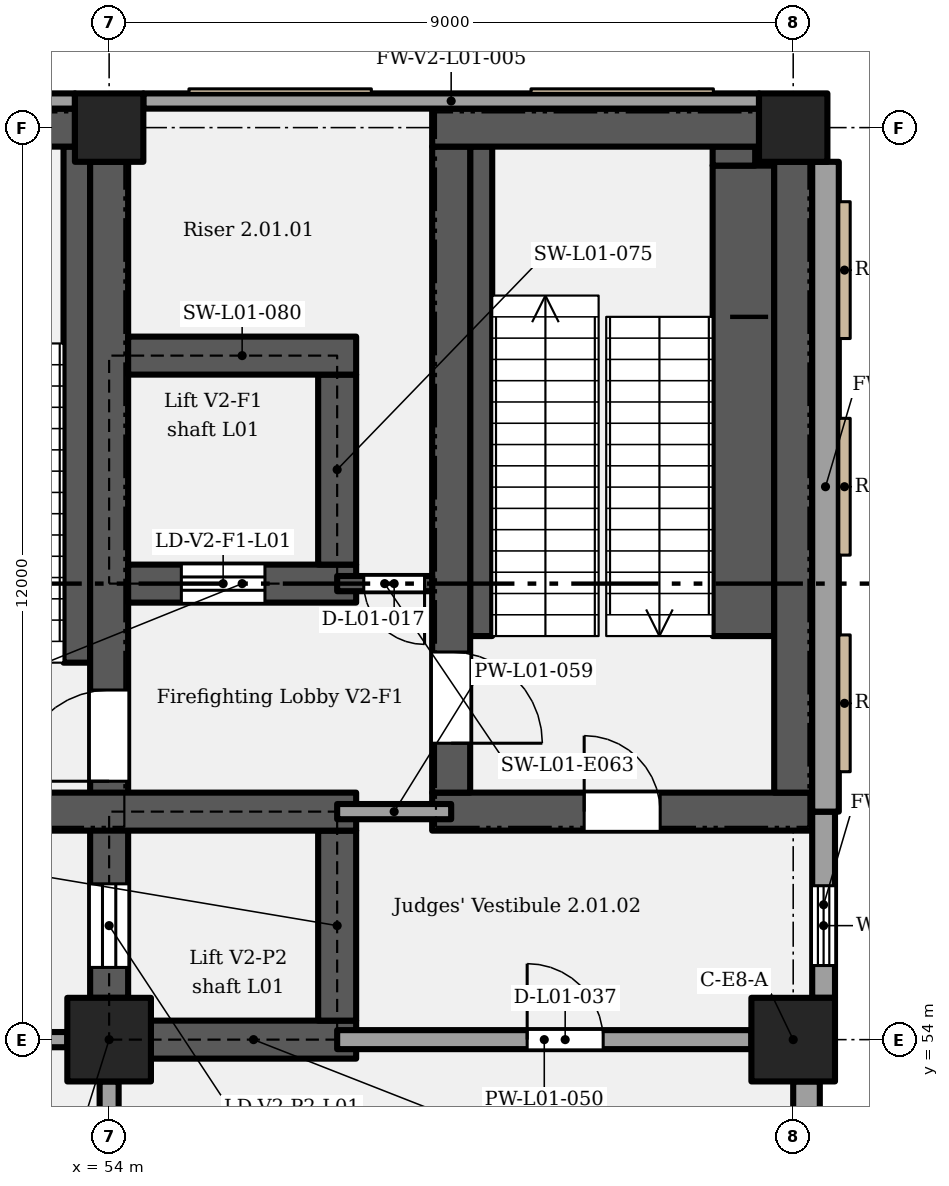
"""IFC4 building model, lengths in metres.
Left out: names, types, materials, properties, quantities, classifications, styles, units other than length and angle.
Written with IfcOpenShell. Run it as: python <this file> out.ifc"""

import sys

from ifc_helpers import new_model, si_unit, direction, frame, frame_2d, origin, origin_2d, place, context, subcontext, project, spatial, rectangle, extrude, element, fill, save


model = new_model("IFC4")
c1 = context("Model", 3, precision=1e-05, world=origin(), true_north=direction((0.0, 1.0)))
c2 = subcontext(c1, "Body", "Model", "MODEL_VIEW")
j1 = project(units=[si_unit("LENGTHUNIT", "METRE"), si_unit("PLANEANGLEUNIT", "RADIAN")], contexts=[c1])
p1 = place(None, origin())
s1 = spatial("IfcSite", under=j1, at=p1, CompositionType="ELEMENT")
p2 = place(p1, origin())
s2 = spatial("IfcBuilding", under=s1, at=p2, CompositionType="ELEMENT")
p3 = place(p2, frame((0.0, 0.0, 6.6)))
s3 = spatial("IfcBuildingStorey", under=s2, at=p3, CompositionType="ELEMENT", Elevation=6.6)
for number, where, z_axis, x_axis in (
    (1, (54.0, 54.0, 0.0), (0.0, 0.0, 1.0), (1.0, 0.0, 0.0)),
    (2, (63.0, 54.0, 0.0), (0.0, 0.0, 1.0), (1.0, 0.0, 0.0)),
):
    element("IfcColumn", number, at=place(p3, frame(where, z_axis=z_axis, x_axis=x_axis)), inside=s3, PredefinedType="COLUMN", context=c2, shape_type="SweptSolid", body=[
        extrude(rectangle(XDim=1.1, YDim=1.1, at=origin_2d()), origin(), (0.0, 0.0, 1.0), 5.4),
    ])
for number, where, z_axis, x_axis in (
    (3, (54.0, 66.0, 0.0), (0.0, 0.0, 1.0), (1.0, 0.0, 0.0)),
    (4, (63.0, 66.0, 0.0), (0.0, 0.0, 1.0), (1.0, 0.0, 0.0)),
):
    element("IfcColumn", number, at=place(p3, frame(where, z_axis=z_axis, x_axis=x_axis)), inside=s3, PredefinedType="COLUMN", context=c2, shape_type="SweptSolid", body=[
        extrude(rectangle(XDim=0.9, YDim=0.9, at=origin_2d()), origin(), (0.0, 0.0, 1.0), 5.4),
    ])
p4 = place(p3, frame((54.55, 54.0, 0.0), z_axis=(0.0, 0.0, 1.0), x_axis=(1.0, 0.0, 0.0)))
e5 = element("IfcWall", 5, at=p4, inside=s3, PredefinedType="SHEAR", context=c2, shape_type="SweptSolid", body=[
    extrude(rectangle(XDim=2.7, YDim=0.5, at=frame_2d((1.35, 0.0))), origin(), (0.0, 0.0, 1.0), 5.1),
])
p5 = place(p3, frame((57.0, 54.25, 0.0), z_axis=(0.0, 0.0, 1.0), x_axis=(0.0, 1.0, 0.0)))
e6 = element("IfcWall", 6, at=p5, inside=s3, PredefinedType="SHEAR", context=c2, shape_type="SweptSolid", body=[
    extrude(rectangle(XDim=2.5, YDim=0.5, at=frame_2d((1.25, 0.0))), origin(), (0.0, 0.0, 1.0), 5.1),
])
p6 = place(p3, frame((54.0, 54.55, 0.0), z_axis=(0.0, 0.0, 1.0), x_axis=(0.0, 1.0, 0.0)))
e7 = element("IfcWall", 7, at=p6, inside=s3, PredefinedType="SHEAR", context=c2, shape_type="SweptSolid", body=[
    extrude(rectangle(XDim=11.0, YDim=0.5, at=frame_2d((5.5, 0.0))), origin(), (0.0, 0.0, 1.0), 5.1),
])
p7 = place(p6, frame((0.4, 0.0, 0.0)))
e8 = element("IfcOpeningElement", 8, at=p7, cuts=e7, PredefinedType="OPENING", context=c2, shape_type="SweptSolid", body=[
    extrude(rectangle(XDim=1.1, YDim=2.1, at=frame_2d((0.55, 1.05))), frame((0.0, 0.26, 0.0), z_axis=(0.0, -1.0, 0.0), x_axis=(1.0, 0.0, 0.0)), (0.0, 0.0, 1.0), 0.52),
])
p8 = place(p6, frame((2.85, 0.0, 0.0)))
e9 = element("IfcOpeningElement", 9, at=p8, cuts=e7, PredefinedType="OPENING", context=c2, shape_type="SweptSolid", body=[
    extrude(rectangle(XDim=1.2, YDim=2.1, at=frame_2d((0.6, 1.05))), frame((0.0, 0.26, 0.0), z_axis=(0.0, -1.0, 0.0), x_axis=(1.0, 0.0, 0.0)), (0.0, 0.0, 1.0), 0.52),
])
p9 = place(p3, frame((46.25, 57.0, 0.0), z_axis=(0.0, 0.0, 1.0), x_axis=(1.0, 0.0, 0.0)))
e10 = element("IfcWall", 10, at=p9, inside=s3, PredefinedType="SHEAR", context=c2, shape_type="SweptSolid", body=[
    extrude(rectangle(XDim=11.0, YDim=0.5, at=frame_2d((5.5, 0.0))), origin(), (0.0, 0.0, 1.0), 5.1),
])
p10 = place(p9, frame((4.9, 0.0, 0.0)))
e11 = element("IfcOpeningElement", 11, at=p10, cuts=e10, PredefinedType="OPENING", context=c2, shape_type="SweptSolid", body=[
    extrude(rectangle(XDim=1.2, YDim=2.1, at=frame_2d((0.6, 1.05))), frame((0.0, 0.26, 0.0), z_axis=(0.0, -1.0, 0.0), x_axis=(1.0, 0.0, 0.0)), (0.0, 0.0, 1.0), 0.52),
])
p11 = place(p3, frame((58.25, 57.0, 0.0), z_axis=(0.0, 0.0, 1.0), x_axis=(1.0, 0.0, 0.0)))
e12 = element("IfcWall", 12, at=p11, inside=s3, PredefinedType="SHEAR", context=c2, shape_type="SweptSolid", body=[
    extrude(rectangle(XDim=5.0, YDim=0.5, at=frame_2d((2.5, 0.0))), origin(), (0.0, 0.0, 1.0), 5.1),
])
p12 = place(p11, frame((2.0, 0.0, 0.0)))
e13 = element("IfcOpeningElement", 13, at=p12, cuts=e12, PredefinedType="OPENING", context=c2, shape_type="SweptSolid", body=[
    extrude(rectangle(XDim=1.0, YDim=2.1, at=frame_2d((0.5, 1.05))), frame((0.0, 0.26, 0.0), z_axis=(0.0, -1.0, 0.0), x_axis=(1.0, 0.0, 0.0)), (0.0, 0.0, 1.0), 0.52),
])
p13 = place(p3, frame((58.5, 57.25, 0.0), z_axis=(0.0, 0.0, 1.0), x_axis=(0.0, 1.0, 0.0)))
e14 = element("IfcWall", 14, at=p13, inside=s3, PredefinedType="SHEAR", context=c2, shape_type="SweptSolid", body=[
    extrude(rectangle(XDim=8.5, YDim=0.5, at=frame_2d((4.25, 0.0))), origin(), (0.0, 0.0, 1.0), 5.1),
])
p14 = place(p13, frame((1.85, 0.0, 0.0), z_axis=(0.0, 0.0, 1.0), x_axis=(-1.0, 0.0, 0.0)))
e15 = element("IfcOpeningElement", 15, at=p14, cuts=e14, PredefinedType="OPENING", context=c2, shape_type="SweptSolid", body=[
    extrude(rectangle(XDim=1.2, YDim=2.1, at=frame_2d((0.6, 1.05))), frame((0.0, 0.26, 0.0), z_axis=(0.0, -1.0, 0.0), x_axis=(1.0, 0.0, 0.0)), (0.0, 0.0, 1.0), 0.52),
])
p15 = place(p3, frame((63.0, 57.25, 0.0), z_axis=(0.0, 0.0, 1.0), x_axis=(0.0, 1.0, 0.0)))
e16 = element("IfcWall", 16, at=p15, inside=s3, PredefinedType="SHEAR", context=c2, shape_type="SweptSolid", body=[
    extrude(rectangle(XDim=8.3, YDim=0.5, at=frame_2d((4.15, 0.0))), origin(), (0.0, 0.0, 1.0), 5.1),
])
p16 = place(p3, frame((54.25, 60.0, 0.0), z_axis=(0.0, 0.0, 1.0), x_axis=(1.0, 0.0, 0.0)))
e17 = element("IfcWall", 17, at=p16, inside=s3, PredefinedType="SHEAR", context=c2, shape_type="SweptSolid", body=[
    extrude(rectangle(XDim=3.0, YDim=0.5, at=frame_2d((1.5, 0.0))), origin(), (0.0, 0.0, 1.0), 5.1),
])
p17 = place(p16, frame((0.7, 0.0, 0.0)))
e18 = element("IfcOpeningElement", 18, at=p17, cuts=e17, PredefinedType="OPENING", context=c2, shape_type="SweptSolid", body=[
    extrude(rectangle(XDim=1.1, YDim=2.1, at=frame_2d((0.55, 1.05))), frame((0.0, 0.26, 0.0), z_axis=(0.0, -1.0, 0.0), x_axis=(1.0, 0.0, 0.0)), (0.0, 0.0, 1.0), 0.52),
])
p18 = place(p3, frame((57.0, 60.25, 0.0), z_axis=(0.0, 0.0, 1.0), x_axis=(0.0, 1.0, 0.0)))
e19 = element("IfcWall", 19, at=p18, inside=s3, PredefinedType="SHEAR", context=c2, shape_type="SweptSolid", body=[
    extrude(rectangle(XDim=2.5, YDim=0.5, at=frame_2d((1.25, 0.0))), origin(), (0.0, 0.0, 1.0), 5.1),
])
p19 = place(p3, frame((54.25, 63.0, 0.0), z_axis=(0.0, 0.0, 1.0), x_axis=(1.0, 0.0, 0.0)))
e20 = element("IfcWall", 20, at=p19, inside=s3, PredefinedType="SHEAR", context=c2, shape_type="SweptSolid", body=[
    extrude(rectangle(XDim=3.0, YDim=0.5, at=frame_2d((1.5, 0.0))), origin(), (0.0, 0.0, 1.0), 5.1),
])
for number, where, z_axis, x_axis in (
    (21, (49.25, 66.0, 0.0), (0.0, 0.0, 1.0), (1.0, 0.0, 0.0)),
    (22, (58.25, 66.0, 0.0), (0.0, 0.0, 1.0), (1.0, 0.0, 0.0)),
):
    element("IfcWall", number, at=place(p3, frame(where, z_axis=z_axis, x_axis=x_axis)), inside=s3, PredefinedType="SHEAR", context=c2, shape_type="SweptSolid", body=[
        extrude(rectangle(XDim=4.3, YDim=0.5, at=frame_2d((2.15, 0.0))), origin(), (0.0, 0.0, 1.0), 5.1),
    ])
p20 = place(p3, frame((45.45, 66.35, 0.0), z_axis=(0.0, 0.0, 1.0), x_axis=(1.0, 0.0, 0.0)))
e23 = element("IfcWall", 23, at=p20, inside=s3, PredefinedType="SOLIDWALL", context=c2, shape_type="SweptSolid", body=[
    extrude(rectangle(XDim=8.1, YDim=0.2, at=frame_2d((4.05, 0.0))), origin(), (0.0, 0.0, 1.0), 5.1),
])
p21 = place(p20, frame((0.6, 0.0, 0.9)))
e24 = element("IfcOpeningElement", 24, at=p21, cuts=e23, PredefinedType="OPENING", context=c2, shape_type="SweptSolid", body=[
    extrude(rectangle(XDim=2.4, YDim=3.3, at=frame_2d((1.2, 1.65))), frame((0.0, 0.11, 0.0), z_axis=(0.0, -1.0, 0.0), x_axis=(1.0, 0.0, 0.0)), (0.0, 0.0, 1.0), 0.22),
])
p22 = place(p3, frame((54.45, 66.35, 0.0), z_axis=(0.0, 0.0, 1.0), x_axis=(1.0, 0.0, 0.0)))
e25 = element("IfcWall", 25, at=p22, inside=s3, PredefinedType="SOLIDWALL", context=c2, shape_type="SweptSolid", body=[
    extrude(rectangle(XDim=8.1, YDim=0.2, at=frame_2d((4.05, 0.0))), origin(), (0.0, 0.0, 1.0), 5.1),
])
p23 = place(p3, frame((63.175, 38.05, 0.0), z_axis=(0.0, 0.0, 1.0), x_axis=(0.0, 1.0, 0.0)))
e26 = element("IfcWall", 26, at=p23, inside=s3, PredefinedType="SOLIDWALL", context=c2, shape_type="SweptSolid", body=[
    extrude(rectangle(XDim=15.4, YDim=0.35, at=frame_2d((7.7, 0.0))), origin(), (0.0, 0.0, 1.0), 5.4),
])
p24 = place(p23, frame((0.35, 0.0, 1.05)))
e27 = element("IfcOpeningElement", 27, at=p24, cuts=e26, PredefinedType="OPENING", context=c2, shape_type="SweptSolid", body=[
    extrude(rectangle(XDim=1.5, YDim=3.75, at=frame_2d((0.75, 1.875))), frame((0.0, 0.185, 0.0), z_axis=(0.0, -1.0, 0.0), x_axis=(1.0, 0.0, 0.0)), (0.0, 0.0, 1.0), 0.37),
])
p25 = place(p23, frame((3.65, 0.0, 1.05)))
e28 = element("IfcOpeningElement", 28, at=p25, cuts=e26, PredefinedType="OPENING", context=c2, shape_type="SweptSolid", body=[
    extrude(rectangle(XDim=1.5, YDim=3.75, at=frame_2d((0.75, 1.875))), frame((0.0, 0.185, 0.0), z_axis=(0.0, -1.0, 0.0), x_axis=(1.0, 0.0, 0.0)), (0.0, 0.0, 1.0), 0.37),
])
p26 = place(p23, frame((6.95, 0.0, 1.05)))
e29 = element("IfcOpeningElement", 29, at=p26, cuts=e26, PredefinedType="OPENING", context=c2, shape_type="SweptSolid", body=[
    extrude(rectangle(XDim=1.5, YDim=3.75, at=frame_2d((0.75, 1.875))), frame((0.0, 0.185, 0.0), z_axis=(0.0, -1.0, 0.0), x_axis=(1.0, 0.0, 0.0)), (0.0, 0.0, 1.0), 0.37),
])
p27 = place(p23, frame((10.25, 0.0, 1.05)))
e30 = element("IfcOpeningElement", 30, at=p27, cuts=e26, PredefinedType="OPENING", context=c2, shape_type="SweptSolid", body=[
    extrude(rectangle(XDim=1.5, YDim=3.75, at=frame_2d((0.75, 1.875))), frame((0.0, 0.185, 0.0), z_axis=(0.0, -1.0, 0.0), x_axis=(1.0, 0.0, 0.0)), (0.0, 0.0, 1.0), 0.37),
])
p28 = place(p23, frame((13.55, 0.0, 1.05)))
e31 = element("IfcOpeningElement", 31, at=p28, cuts=e26, PredefinedType="OPENING", context=c2, shape_type="SweptSolid", body=[
    extrude(rectangle(XDim=1.5, YDim=3.75, at=frame_2d((0.75, 1.875))), frame((0.0, 0.185, 0.0), z_axis=(0.0, -1.0, 0.0), x_axis=(1.0, 0.0, 0.0)), (0.0, 0.0, 1.0), 0.37),
])
p29 = place(p3, frame((63.4, 54.55, 0.0), z_axis=(0.0, 0.0, 1.0), x_axis=(0.0, 1.0, 0.0)))
e32 = element("IfcWall", 32, at=p29, inside=s3, PredefinedType="SOLIDWALL", context=c2, shape_type="SweptSolid", body=[
    extrude(rectangle(XDim=2.45, YDim=0.3, at=frame_2d((1.225, 0.0))), origin(), (0.0, 0.0, 1.0), 5.1),
])
p30 = place(p29, frame((0.425, 0.0, 1.05)))
e33 = element("IfcOpeningElement", 33, at=p30, cuts=e32, PredefinedType="OPENING", context=c2, shape_type="SweptSolid", body=[
    extrude(rectangle(XDim=1.05, YDim=2.4, at=frame_2d((0.525, 1.2))), frame((0.0, 0.16, 0.0), z_axis=(0.0, -1.0, 0.0), x_axis=(1.0, 0.0, 0.0)), (0.0, 0.0, 1.0), 0.32),
])
p31 = place(p3, frame((63.425, 57.0, 0.0), z_axis=(0.0, 0.0, 1.0), x_axis=(0.0, 1.0, 0.0)))
e34 = element("IfcWall", 34, at=p31, inside=s3, PredefinedType="SOLIDWALL", context=c2, shape_type="SweptSolid", body=[
    extrude(rectangle(XDim=8.55, YDim=0.35, at=frame_2d((4.275, 0.0))), origin(), (0.0, 0.0, 1.0), 5.1),
])
p32 = place(p3, frame((49.5, 54.0, 0.0), z_axis=(0.0, 0.0, 1.0), x_axis=(1.0, 0.0, 0.0)))
e35 = element("IfcWall", 35, at=p32, inside=s3, PredefinedType="PARTITIONING", context=c2, shape_type="SweptSolid", body=[
    extrude(rectangle(XDim=3.95, YDim=0.2, at=frame_2d((1.975, 0.0))), origin(), (0.0, 0.0, 1.0), 4.35),
])
p33 = place(p32, frame((1.35, 0.0, 0.0)))
e36 = element("IfcOpeningElement", 36, at=p33, cuts=e35, PredefinedType="OPENING", context=c2, shape_type="SweptSolid", body=[
    extrude(rectangle(XDim=1.8, YDim=2.1, at=frame_2d((0.9, 1.05))), frame((0.0, 0.11, 0.0), z_axis=(0.0, -1.0, 0.0), x_axis=(1.0, 0.0, 0.0)), (0.0, 0.0, 1.0), 0.22),
])
p34 = place(p3, frame((57.0, 54.0, 0.0), z_axis=(0.0, 0.0, 1.0), x_axis=(1.0, 0.0, 0.0)))
e37 = element("IfcWall", 37, at=p34, inside=s3, PredefinedType="PARTITIONING", context=c2, shape_type="SweptSolid", body=[
    extrude(rectangle(XDim=5.45, YDim=0.25, at=frame_2d((2.725, 0.0))), origin(), (0.0, 0.0, 1.0), 4.35),
])
p35 = place(p34, frame((2.5, 0.0, 0.0)))
e38 = element("IfcOpeningElement", 38, at=p35, cuts=e37, PredefinedType="OPENING", context=c2, shape_type="SweptSolid", body=[
    extrude(rectangle(XDim=1.0, YDim=2.1, at=frame_2d((0.5, 1.05))), frame((0.0, 0.135, 0.0), z_axis=(0.0, -1.0, 0.0), x_axis=(1.0, 0.0, 0.0)), (0.0, 0.0, 1.0), 0.27),
])
p36 = place(p3, frame((57.0, 57.0, 0.0), z_axis=(0.0, 0.0, 1.0), x_axis=(1.0, 0.0, 0.0)))
e39 = element("IfcWall", 39, at=p36, inside=s3, PredefinedType="PARTITIONING", context=c2, shape_type="SweptSolid", body=[
    extrude(rectangle(XDim=1.5, YDim=0.2, at=frame_2d((0.75, 0.0))), origin(), (0.0, 0.0, 1.0), 5.1),
])
p37 = place(p3, frame((57.0, 60.0, 0.0), z_axis=(0.0, 0.0, 1.0), x_axis=(1.0, 0.0, 0.0)))
e40 = element("IfcWall", 40, at=p37, inside=s3, PredefinedType="SHEAR", context=c2, shape_type="SweptSolid", body=[
    extrude(rectangle(XDim=1.25, YDim=0.2, at=frame_2d((0.625, 0.0))), origin(), (0.0, 0.0, 1.0), 5.1),
])
p38 = place(p37, frame((1.15, 0.0, 0.0), z_axis=(0.0, 0.0, 1.0), x_axis=(-1.0, 0.0, 0.0)))
e41 = element("IfcOpeningElement", 41, at=p38, cuts=e40, PredefinedType="OPENING", context=c2, shape_type="SweptSolid", body=[
    extrude(rectangle(XDim=0.8, YDim=2.0, at=frame_2d((0.4, 1.0))), frame((0.0, 0.11, 0.0), z_axis=(0.0, -1.0, 0.0), x_axis=(1.0, 0.0, 0.0)), (0.0, 0.0, 1.0), 0.22),
])
p39 = place(p3, frame((54.0, 38.05, 0.0), z_axis=(0.0, 0.0, 1.0), x_axis=(0.0, 1.0, 0.0)))
e42 = element("IfcWall", 42, at=p39, inside=s3, PredefinedType="PARTITIONING", context=c2, shape_type="SweptSolid", body=[
    extrude(rectangle(XDim=15.4, YDim=0.25, at=frame_2d((7.7, 0.0))), origin(), (0.0, 0.0, 1.0), 4.15),
])
p40 = place(p39, frame((1.55, 0.0, 0.0)))
e43 = element("IfcOpeningElement", 43, at=p40, cuts=e42, PredefinedType="OPENING", context=c2, shape_type="SweptSolid", body=[
    extrude(rectangle(XDim=1.8, YDim=2.4, at=frame_2d((0.9, 1.2))), frame((0.0, 0.135, 0.0), z_axis=(0.0, -1.0, 0.0), x_axis=(1.0, 0.0, 0.0)), (0.0, 0.0, 1.0), 0.27),
])
p41 = place(p39, frame((12.55, 0.0, 0.0)))
e44 = element("IfcOpeningElement", 44, at=p41, cuts=e42, PredefinedType="OPENING", context=c2, shape_type="SweptSolid", body=[
    extrude(rectangle(XDim=1.8, YDim=2.4, at=frame_2d((0.9, 1.2))), frame((0.0, 0.135, 0.0), z_axis=(0.0, -1.0, 0.0), x_axis=(1.0, 0.0, 0.0)), (0.0, 0.0, 1.0), 0.27),
])
p42 = place(p3, frame((53.575, 58.96, 0.0), z_axis=(0.0, 0.0, 1.0), x_axis=(0.0, 1.0, 0.0)))
e45 = element("IfcWall", 45, at=p42, inside=s3, PredefinedType="SHEAR", context=c2, shape_type="SweptSolid", body=[
    extrude(rectangle(XDim=6.79, YDim=0.35, at=frame_2d((3.395, 0.0))), origin(), (0.0, 0.0, 1.0), 5.1),
])
p43 = place(p3, frame((58.895, 59.31, 0.0), z_axis=(0.0, 0.0, 1.0), x_axis=(0.0, 1.0, 0.0)))
e46 = element("IfcWall", 46, at=p43, inside=s3, PredefinedType="SHEAR", context=c2, shape_type="SweptSolid", body=[
    extrude(rectangle(XDim=6.44, YDim=0.29, at=frame_2d((3.22, 0.0))), origin(), (0.0, 0.0, 1.0), 2.587),
])
p44 = place(p3, frame((62.345, 59.31, 0.0), z_axis=(0.0, 0.0, 1.0), x_axis=(0.0, 1.0, 0.0)))
e47 = element("IfcWall", 47, at=p44, inside=s3, PredefinedType="SHEAR", context=c2, shape_type="SweptSolid", body=[
    extrude(rectangle(XDim=6.19, YDim=0.81, at=frame_2d((3.095, 0.0))), origin(), (0.0, 0.0, 1.0), 2.587),
])
p45 = place(p3, frame((62.22, 65.5, 0.0), z_axis=(0.0, 0.0, 1.0), x_axis=(0.0, 1.0, 0.0)))
e48 = element("IfcWall", 48, at=p45, inside=s3, PredefinedType="SHEAR", context=c2, shape_type="SweptSolid", body=[
    extrude(rectangle(XDim=0.25, YDim=0.56, at=frame_2d((0.125, 0.0))), origin(), (0.0, 0.0, 1.0), 2.587),
])
p46 = place(p30, origin())
e49 = element("IfcWindow", 49, at=p46, inside=s3, PartitioningType="SINGLE_PANEL", PredefinedType="WINDOW", context=c2, shape_type="SweptSolid", body=[
    extrude(rectangle(XDim=1.05, YDim=2.4, at=frame_2d((0.525, 1.2))), frame((0.0, 0.03, 0.0), z_axis=(0.0, -1.0, 0.0), x_axis=(1.0, 0.0, 0.0)), (0.0, 0.0, 1.0), 0.06),
])
fill(e33, e49)
p47 = place(p7, origin())
e50 = element("IfcDoor", 50, at=p47, inside=s3, OperationType="SLIDING_TO_LEFT", PredefinedType="DOOR", context=c2, shape_type="SweptSolid", body=[
    extrude(rectangle(XDim=1.1, YDim=2.1, at=frame_2d((0.55, 1.05))), frame((0.0, 0.025, 0.0), z_axis=(0.0, -1.0, 0.0), x_axis=(1.0, 0.0, 0.0)), (0.0, 0.0, 1.0), 0.05),
])
fill(e8, e50)
p48 = place(p17, origin())
e51 = element("IfcDoor", 51, at=p48, inside=s3, OperationType="SLIDING_TO_LEFT", PredefinedType="DOOR", context=c2, shape_type="SweptSolid", body=[
    extrude(rectangle(XDim=1.1, YDim=2.1, at=frame_2d((0.55, 1.05))), frame((0.0, 0.025, 0.0), z_axis=(0.0, -1.0, 0.0), x_axis=(1.0, 0.0, 0.0)), (0.0, 0.0, 1.0), 0.05),
])
fill(e18, e51)
p49 = place(p8, origin())
e52 = element("IfcDoor", 52, at=p49, inside=s3, OperationType="SINGLE_SWING_LEFT", PredefinedType="DOOR", context=c2, shape_type="SweptSolid", body=[
    extrude(rectangle(XDim=1.2, YDim=2.1, at=frame_2d((0.6, 1.05))), frame((0.0, 0.025, 0.0), z_axis=(0.0, -1.0, 0.0), x_axis=(1.0, 0.0, 0.0)), (0.0, 0.0, 1.0), 0.05),
])
fill(e9, e52)
p50 = place(p14, origin())
e53 = element("IfcDoor", 53, at=p50, inside=s3, OperationType="SINGLE_SWING_RIGHT", PredefinedType="DOOR", context=c2, shape_type="SweptSolid", body=[
    extrude(rectangle(XDim=1.2, YDim=2.1, at=frame_2d((0.6, 1.05))), frame((0.0, 0.025, 0.0), z_axis=(0.0, -1.0, 0.0), x_axis=(1.0, 0.0, 0.0)), (0.0, 0.0, 1.0), 0.05),
])
fill(e15, e53)
p51 = place(p38, origin())
e54 = element("IfcDoor", 54, at=p51, inside=s3, OperationType="SINGLE_SWING_LEFT", PredefinedType="DOOR", context=c2, shape_type="SweptSolid", body=[
    extrude(rectangle(XDim=0.8, YDim=2.0, at=frame_2d((0.4, 1.0))), frame((0.0, 0.025, 0.0), z_axis=(0.0, -1.0, 0.0), x_axis=(1.0, 0.0, 0.0)), (0.0, 0.0, 1.0), 0.05),
])
fill(e41, e54)
p52 = place(p12, origin())
e55 = element("IfcDoor", 55, at=p52, inside=s3, OperationType="SINGLE_SWING_LEFT", PredefinedType="DOOR", context=c2, shape_type="SweptSolid", body=[
    extrude(rectangle(XDim=1.0, YDim=2.1, at=frame_2d((0.5, 1.05))), frame((0.0, 0.025, 0.0), z_axis=(0.0, -1.0, 0.0), x_axis=(1.0, 0.0, 0.0)), (0.0, 0.0, 1.0), 0.05),
])
fill(e13, e55)
p53 = place(p35, origin())
e56 = element("IfcDoor", 56, at=p53, inside=s3, OperationType="SINGLE_SWING_LEFT", PredefinedType="DOOR", context=c2, shape_type="SweptSolid", body=[
    extrude(rectangle(XDim=1.0, YDim=2.1, at=frame_2d((0.5, 1.05))), frame((0.0, 0.025, 0.0), z_axis=(0.0, -1.0, 0.0), x_axis=(1.0, 0.0, 0.0)), (0.0, 0.0, 1.0), 0.05),
])
fill(e38, e56)
save(model, sys.argv[1])
